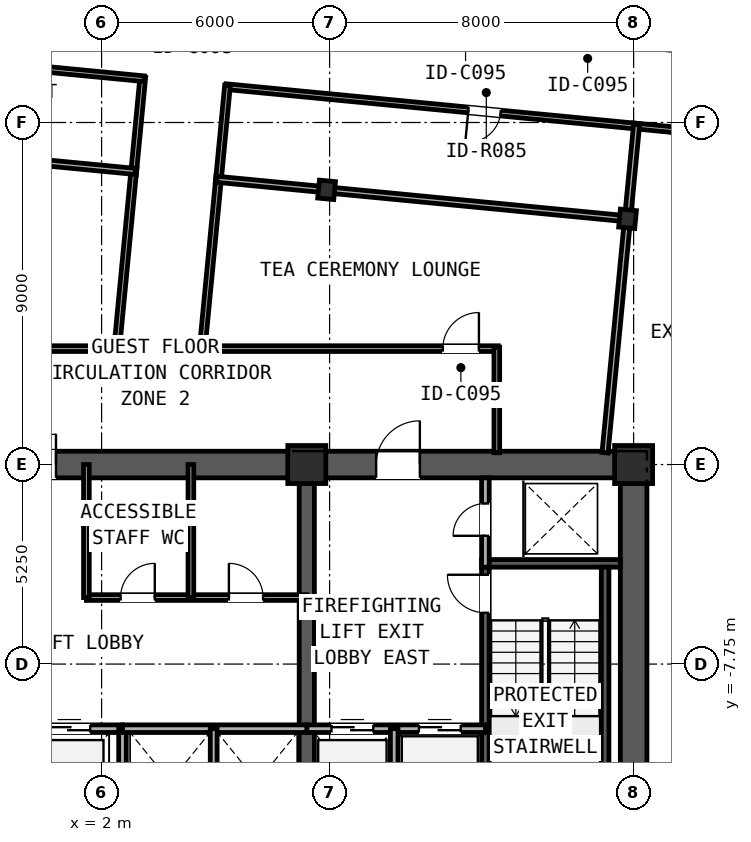
"""IFC4 building model, lengths in metres.
Left out: names, types, materials, properties, quantities, classifications, styles, units other than length and angle.
Written with IfcOpenShell. Run it as: python <this file> out.ifc"""

import sys

from ifc_helpers import new_model, si_unit, direction, frame, frame_2d, origin, origin_2d, place, context, subcontext, project, spatial, rectangle, i_section, extrude, element, fill, save


model = new_model("IFC4")
c1 = context("Model", 3, precision=1e-05, world=origin(), true_north=direction((0.0, 1.0)))
c2 = subcontext(c1, "Body", "Model", "MODEL_VIEW")
j1 = project(units=[si_unit("LENGTHUNIT", "METRE"), si_unit("PLANEANGLEUNIT", "RADIAN")], contexts=[c1])
p1 = place(None, origin())
s1 = spatial("IfcSite", under=j1, at=p1, CompositionType="ELEMENT")
p2 = place(p1, origin())
s2 = spatial("IfcBuilding", under=s1, at=p2, CompositionType="ELEMENT")
p3 = place(p2, frame((0.0, 0.0, 146.25)))
s3 = spatial("IfcBuildingStorey", under=s2, at=p3, CompositionType="ELEMENT", Elevation=146.25)
p4 = place(p3, frame((-16.35, -2.5, 0.0), z_axis=(0.0, 0.0, 1.0), x_axis=(1.0, 0.0, 0.0)))
e1 = element("IfcWall", 1, at=p4, inside=s3, PredefinedType="SHEAR", context=c2, shape_type="SweptSolid", body=[
    extrude(rectangle(XDim=32.7, YDim=0.7, at=frame_2d((16.35, 0.0))), origin(), (0.0, 0.0, 1.0), 2.91),
])
p5 = place(p4, frame((5.975, 0.0, 0.0)))
e2 = element("IfcOpeningElement", 2, at=p5, cuts=e1, PredefinedType="OPENING", context=c2, shape_type="SweptSolid", body=[
    extrude(rectangle(XDim=1.15, YDim=2.0, at=frame_2d((0.575, 1.0))), frame((0.0, 0.36, 0.0), z_axis=(0.0, -1.0, 0.0), x_axis=(1.0, 0.0, 0.0)), (0.0, 0.0, 1.0), 0.72),
])
p6 = place(p4, frame((15.55, 0.0, 0.0)))
e3 = element("IfcOpeningElement", 3, at=p6, cuts=e1, PredefinedType="OPENING", context=c2, shape_type="SweptSolid", body=[
    extrude(rectangle(XDim=1.6, YDim=2.0, at=frame_2d((0.8, 1.0))), frame((0.0, 0.36, 0.0), z_axis=(0.0, -1.0, 0.0), x_axis=(1.0, 0.0, 0.0)), (0.0, 0.0, 1.0), 0.72),
])
p7 = place(p4, frame((25.575, 0.0, 0.0)))
e4 = element("IfcOpeningElement", 4, at=p7, cuts=e1, PredefinedType="OPENING", context=c2, shape_type="SweptSolid", body=[
    extrude(rectangle(XDim=1.15, YDim=2.0, at=frame_2d((0.575, 1.0))), frame((0.0, 0.36, 0.0), z_axis=(0.0, -1.0, 0.0), x_axis=(1.0, 0.0, 0.0)), (0.0, 0.0, 1.0), 0.72),
])
p8 = place(p3, frame((16.0, -12.65, 0.0), z_axis=(0.0, 0.0, 1.0), x_axis=(0.0, 1.0, 0.0)))
e5 = element("IfcWall", 5, at=p8, inside=s3, PredefinedType="SHEAR", context=c2, shape_type="SweptSolid", body=[
    extrude(rectangle(XDim=9.8, YDim=0.7, at=frame_2d((4.9, 0.0))), origin(), (0.0, 0.0, 1.0), 2.91),
])
p9 = place(p3, frame((7.4, -12.65, 0.0), z_axis=(0.0, 0.0, 1.0), x_axis=(0.0, 1.0, 0.0)))
e6 = element("IfcWall", 6, at=p9, inside=s3, PredefinedType="SHEAR", context=c2, shape_type="SweptSolid", body=[
    extrude(rectangle(XDim=9.8, YDim=0.4, at=frame_2d((4.9, 0.0))), origin(), (0.0, 0.0, 1.0), 3.19),
])
p10 = place(p3, frame((12.0, -5.1, 0.0), z_axis=(0.0, 0.0, 1.0), x_axis=(1.0, 0.0, 0.0)))
e7 = element("IfcWall", 7, at=p10, inside=s3, PredefinedType="SOLIDWALL", context=c2, shape_type="SweptSolid", body=[
    extrude(rectangle(XDim=3.65, YDim=0.2, at=frame_2d((1.825, 0.0))), origin(), (0.0, 0.0, 1.0), 3.19),
])
p11 = place(p3, frame((12.1, -12.2, 0.0), z_axis=(0.0, 0.0, 1.0), x_axis=(0.0, 1.0, 0.0)))
e8 = element("IfcWall", 8, at=p11, inside=s3, PredefinedType="SOLIDWALL", context=c2, shape_type="SweptSolid", body=[
    extrude(rectangle(XDim=7.0, YDim=0.2, at=frame_2d((3.5, 0.0))), origin(), (0.0, 0.0, 1.0), 3.19),
])
p12 = place(p11, frame((5.8, 0.0, 0.0)))
e9 = element("IfcOpeningElement", 9, at=p12, cuts=e8, PredefinedType="OPENING", context=c2, shape_type="SweptSolid", body=[
    extrude(rectangle(XDim=1.0, YDim=2.1, at=frame_2d((0.5, 1.05))), frame((0.0, 0.11, 0.0), z_axis=(0.0, -1.0, 0.0), x_axis=(1.0, 0.0, 0.0)), (0.0, 0.0, 1.0), 0.22),
])
p13 = place(p3, frame((15.25, -12.2, 0.0), z_axis=(0.0, 0.0, 1.0), x_axis=(0.0, 1.0, 0.0)))
e10 = element("IfcWall", 10, at=p13, inside=s3, PredefinedType="SOLIDWALL", context=c2, shape_type="SweptSolid", body=[
    extrude(rectangle(XDim=7.0, YDim=0.2, at=frame_2d((3.5, 0.0))), origin(), (0.0, 0.0, 1.0), 3.19),
])
for number, where, z_axis, x_axis in (
    (11, (7.4, -2.5, 0.0), (0.0, 0.0, 1.0), (1.0, 0.0, 0.0)),
    (12, (16.0, -2.5, 0.0), (0.0, 0.0, 1.0), (1.0, 0.0, 0.0)),
):
    element("IfcColumn", number, at=place(p3, frame(where, z_axis=z_axis, x_axis=x_axis)), inside=s3, PredefinedType="COLUMN", context=c2, shape_type="SweptSolid", body=[
        extrude(rectangle(XDim=1.0, YDim=1.0, at=origin_2d()), origin(), (0.0, 0.0, 1.0), 3.45),
    ])
for number, where, z_axis, x_axis in (
    (13, (7.921, 4.728, 0.0), (0.0, 0.0, 1.0), (0.995, -0.096, 0.0)),
    (14, (15.84, 3.965, 0.0), (0.0, 0.0, 1.0), (0.995, -0.096, 0.0)),
):
    element("IfcColumn", number, at=place(p3, frame(where, z_axis=z_axis, x_axis=x_axis)), inside=s3, PredefinedType="COLUMN", context=c2, shape_type="SweptSolid", body=[
        extrude(i_section(OverallWidth=0.424, OverallDepth=0.474, WebThickness=0.048, FlangeThickness=0.077, FilletRadius=0.031, at=origin_2d()), origin(), (0.0, 0.0, 1.0), 3.45),
    ])
p14 = place(p3, frame((12.1, -5.2, 0.0), z_axis=(0.0, 0.0, 1.0), x_axis=(0.0, 1.0, 0.0)))
e15 = element("IfcWall", 15, at=p14, inside=s3, PredefinedType="PARTITIONING", context=c2, shape_type="SweptSolid", body=[
    extrude(rectangle(XDim=2.35, YDim=0.2, at=frame_2d((1.175, 0.0))), origin(), (0.0, 0.0, 1.0), 2.225),
])
p15 = place(p14, frame((0.825, 0.0, 0.0)))
e16 = element("IfcOpeningElement", 16, at=p15, cuts=e15, PredefinedType="OPENING", context=c2, shape_type="SweptSolid", body=[
    extrude(rectangle(XDim=0.85, YDim=2.05, at=frame_2d((0.425, 1.025))), frame((0.0, 0.11, 0.0), z_axis=(0.0, -1.0, 0.0), x_axis=(1.0, 0.0, 0.0)), (0.0, 0.0, 1.0), 0.22),
])
p16 = place(p3, frame((7.4, -9.45, 0.0), z_axis=(0.0, 0.0, 1.0), x_axis=(1.0, 0.0, 0.0)))
e17 = element("IfcWall", 17, at=p16, inside=s3, PredefinedType="PARTITIONING", context=c2, shape_type="SweptSolid", body=[
    extrude(rectangle(XDim=4.7, YDim=0.2, at=frame_2d((2.35, 0.0))), origin(), (0.0, 0.0, 1.0), 3.19),
])
p17 = place(p16, frame((2.95, 0.0, 0.0)))
e18 = element("IfcOpeningElement", 18, at=p17, cuts=e17, PredefinedType="OPENING", context=c2, shape_type="SweptSolid", body=[
    extrude(rectangle(XDim=1.1, YDim=2.2, at=frame_2d((0.55, 1.1))), frame((0.0, 0.11, 0.0), z_axis=(0.0, -1.0, 0.0), x_axis=(1.0, 0.0, 0.0)), (0.0, 0.0, 1.0), 0.22),
])
p18 = place(p16, frame((0.65, 0.0, 0.0)))
e19 = element("IfcOpeningElement", 19, at=p18, cuts=e17, PredefinedType="OPENING", context=c2, shape_type="SweptSolid", body=[
    extrude(rectangle(XDim=1.1, YDim=2.2, at=frame_2d((0.55, 1.1))), frame((0.0, 0.11, 0.0), z_axis=(0.0, -1.0, 0.0), x_axis=(1.0, 0.0, 0.0)), (0.0, 0.0, 1.0), 0.22),
])
p19 = place(p3, frame((9.7, -12.65, 0.0), z_axis=(0.0, 0.0, 1.0), x_axis=(0.0, 1.0, 0.0)))
e20 = element("IfcWall", 20, at=p19, inside=s3, PredefinedType="PARTITIONING", context=c2, shape_type="SweptSolid", body=[
    extrude(rectangle(XDim=3.2, YDim=0.2, at=frame_2d((1.6, 0.0))), origin(), (0.0, 0.0, 1.0), 2.225),
])
p20 = place(p3, frame((-2.55, -9.45, 0.0), z_axis=(0.0, 0.0, 1.0), x_axis=(1.0, 0.0, 0.0)))
e21 = element("IfcWall", 21, at=p20, inside=s3, PredefinedType="PARTITIONING", context=c2, shape_type="SweptSolid", body=[
    extrude(rectangle(XDim=5.1, YDim=0.2, at=frame_2d((2.55, 0.0))), origin(), (0.0, 0.0, 1.0), 3.19),
])
p21 = place(p20, frame((0.85, 0.0, 0.0)))
e22 = element("IfcOpeningElement", 22, at=p21, cuts=e21, PredefinedType="OPENING", context=c2, shape_type="SweptSolid", body=[
    extrude(rectangle(XDim=1.1, YDim=2.2, at=frame_2d((0.55, 1.1))), frame((0.0, 0.11, 0.0), z_axis=(0.0, -1.0, 0.0), x_axis=(1.0, 0.0, 0.0)), (0.0, 0.0, 1.0), 0.22),
])
p22 = place(p20, frame((3.15, 0.0, 0.0)))
e23 = element("IfcOpeningElement", 23, at=p22, cuts=e21, PredefinedType="OPENING", context=c2, shape_type="SweptSolid", body=[
    extrude(rectangle(XDim=1.1, YDim=2.2, at=frame_2d((0.55, 1.1))), frame((0.0, 0.11, 0.0), z_axis=(0.0, -1.0, 0.0), x_axis=(1.0, 0.0, 0.0)), (0.0, 0.0, 1.0), 0.22),
])
p23 = place(p3, frame((2.55, -12.65, 0.0), z_axis=(0.0, 0.0, 1.0), x_axis=(0.0, 1.0, 0.0)))
e24 = element("IfcWall", 24, at=p23, inside=s3, PredefinedType="PARTITIONING", context=c2, shape_type="SweptSolid", body=[
    extrude(rectangle(XDim=3.2, YDim=0.2, at=frame_2d((1.6, 0.0))), origin(), (0.0, 0.0, 1.0), 2.225),
])
p24 = place(p3, frame((2.55, -9.45, 0.0), z_axis=(0.0, 0.0, 1.0), x_axis=(1.0, 0.0, 0.0)))
e25 = element("IfcWall", 25, at=p24, inside=s3, PredefinedType="PARTITIONING", context=c2, shape_type="SweptSolid", body=[
    extrude(rectangle(XDim=4.85, YDim=0.2, at=frame_2d((2.425, 0.0))), origin(), (0.0, 0.0, 1.0), 3.19),
])
p25 = place(p3, frame((4.95, -12.65, 0.0), z_axis=(0.0, 0.0, 1.0), x_axis=(0.0, 1.0, 0.0)))
e26 = element("IfcWall", 26, at=p25, inside=s3, PredefinedType="PARTITIONING", context=c2, shape_type="SweptSolid", body=[
    extrude(rectangle(XDim=3.2, YDim=0.18, at=frame_2d((1.6, 0.0))), origin(), (0.0, 0.0, 1.0), 2.225),
])
p26 = place(p3, frame((1.6, -6.0, 0.0), z_axis=(0.0, 0.0, 1.0), x_axis=(1.0, 0.0, 0.0)))
e27 = element("IfcWall", 27, at=p26, inside=s3, PredefinedType="PARTITIONING", context=c2, shape_type="SweptSolid", body=[
    extrude(rectangle(XDim=5.8, YDim=0.15, at=frame_2d((2.9, 0.0))), origin(), (0.0, 0.0, 1.0), 3.19),
])
p27 = place(p26, frame((0.9, 0.0, 0.0)))
e28 = element("IfcOpeningElement", 28, at=p27, cuts=e27, PredefinedType="OPENING", context=c2, shape_type="SweptSolid", body=[
    extrude(rectangle(XDim=0.9, YDim=2.1, at=frame_2d((0.45, 1.05))), frame((0.0, 0.085, 0.0), z_axis=(0.0, -1.0, 0.0), x_axis=(1.0, 0.0, 0.0)), (0.0, 0.0, 1.0), 0.17),
])
p28 = place(p26, frame((3.75, 0.0, 0.0)))
e29 = element("IfcOpeningElement", 29, at=p28, cuts=e27, PredefinedType="OPENING", context=c2, shape_type="SweptSolid", body=[
    extrude(rectangle(XDim=0.9, YDim=2.1, at=frame_2d((0.45, 1.05))), frame((0.0, 0.085, 0.0), z_axis=(0.0, -1.0, 0.0), x_axis=(1.0, 0.0, 0.0)), (0.0, 0.0, 1.0), 0.17),
])
for number, where, z_axis, x_axis in (
    (30, (1.6, -6.0, 0.0), (0.0, 0.0, 1.0), (0.0, 1.0, 0.0)),
    (31, (4.35, -6.0, 0.0), (0.0, 0.0, 1.0), (0.0, 1.0, 0.0)),
):
    element("IfcWall", number, at=place(p3, frame(where, z_axis=z_axis, x_axis=x_axis)), inside=s3, PredefinedType="PARTITIONING", context=c2, shape_type="SweptSolid", body=[
        extrude(rectangle(XDim=3.5, YDim=0.15, at=frame_2d((1.75, 0.0))), origin(), (0.0, 0.0, 1.0), 2.225),
    ])
p29 = place(p3, frame((16.199, 8.552, 0.0), z_axis=(0.0, 0.0, 1.0), x_axis=(0.995391104887, -0.095898635608, 0.0)))
e32 = element("IfcWall", 32, at=p29, inside=s3, PredefinedType="PARTITIONING", context=c2, shape_type="SweptSolid", body=[
    extrude(rectangle(XDim=3.722, YDim=0.15, at=frame_2d((1.861, 0.0))), origin(), (0.0, 0.0, 1.0), 2.479),
])
p30 = place(p29, frame((2.457, 0.0, 0.0)))
e33 = element("IfcOpeningElement", 33, at=p30, cuts=e32, PredefinedType="OPENING", context=c2, shape_type="SweptSolid", body=[
    extrude(rectangle(XDim=0.95, YDim=2.15, at=frame_2d((0.475, 1.075))), frame((0.0, 0.085, 0.0), z_axis=(0.0, -1.0, 0.0), x_axis=(1.0, 0.0, 0.0)), (0.0, 0.0, 1.0), 0.17),
])
p31 = place(p3, frame((16.156, 6.396, 0.0), z_axis=(0.0, 0.0, 1.0), x_axis=(-0.99539478422, 0.095860437863, 0.0)))
e34 = element("IfcWall", 34, at=p31, inside=s3, PredefinedType="PARTITIONING", context=c2, shape_type="SweptSolid", body=[
    extrude(rectangle(XDim=10.936, YDim=0.15, at=frame_2d((5.468, 0.0))), origin(), (0.0, 0.0, 1.0), 2.479),
])
p32 = place(p31, frame((3.675, 0.0, 0.0)))
e35 = element("IfcOpeningElement", 35, at=p32, cuts=e34, PredefinedType="OPENING", context=c2, shape_type="SweptSolid", body=[
    extrude(rectangle(XDim=0.85, YDim=2.05, at=frame_2d((0.425, 1.025))), frame((0.0, 0.085, 0.0), z_axis=(0.0, -1.0, 0.0), x_axis=(1.0, 0.0, 0.0)), (0.0, 0.0, 1.0), 0.17),
])
for number, where, z_axis, x_axis in (
    (36, (5.314, 7.48, 0.0), (0.0, 0.0, 1.0), (-0.096, -0.995, 0.0)),
    (37, (2.838, 5.135, 0.0), (0.0, 0.0, 1.0), (0.096, 0.995, 0.0)),
):
    element("IfcWall", number, at=place(p3, frame(where, z_axis=z_axis, x_axis=x_axis)), inside=s3, PredefinedType="PARTITIONING", context=c2, shape_type="SweptSolid", body=[
        extrude(rectangle(XDim=2.572, YDim=0.15, at=frame_2d((1.286, 0.0))), origin(), (0.0, 0.0, 1.0), 2.479),
    ])
p33 = place(p3, frame((3.121, 7.651, 0.0), z_axis=(0.0, 0.0, 1.0), x_axis=(-0.995397135603, 0.095836018457, 0.0)))
e38 = element("IfcWall", 38, at=p33, inside=s3, PredefinedType="PARTITIONING", context=c2, shape_type="SweptSolid", body=[
    extrude(rectangle(XDim=18.892, YDim=0.15, at=frame_2d((9.446, 0.0))), origin(), (0.0, 0.0, 1.0), 2.479),
])
p34 = place(p33, frame((14.502, 0.0, 0.0)))
e39 = element("IfcOpeningElement", 39, at=p34, cuts=e38, PredefinedType="OPENING", context=c2, shape_type="SweptSolid", body=[
    extrude(rectangle(XDim=0.95, YDim=2.15, at=frame_2d((0.475, 1.075))), frame((0.0, 0.085, 0.0), z_axis=(0.0, -1.0, 0.0), x_axis=(1.0, 0.0, 0.0)), (0.0, 0.0, 1.0), 0.17),
])
p35 = place(p3, frame((5.084, 5.083, 0.0), z_axis=(0.0, 0.0, 1.0), x_axis=(-0.095867331855, -0.995394120277, 0.0)))
e40 = element("IfcWall", 40, at=p35, inside=s3, PredefinedType="PARTITIONING", context=c2, shape_type="SweptSolid", body=[
    extrude(rectangle(XDim=4.594, YDim=0.15, at=frame_2d((2.297, 0.0))), origin(), (0.0, 0.0, 1.0), 2.479),
])
p36 = place(p3, frame((4.607, 0.55, 0.0), z_axis=(0.0, 0.0, 1.0), x_axis=(1.0, 0.0, 0.0)))
e41 = element("IfcWall", 41, at=p36, inside=s3, PredefinedType="PARTITIONING", context=c2, shape_type="SweptSolid", body=[
    extrude(rectangle(XDim=7.833, YDim=0.15, at=frame_2d((3.917, 0.0))), origin(), (0.0, 0.0, 1.0), 2.479),
])
p37 = place(p36, frame((6.372, 0.0, 0.0)))
e42 = element("IfcOpeningElement", 42, at=p37, cuts=e41, PredefinedType="OPENING", context=c2, shape_type="SweptSolid", body=[
    extrude(rectangle(XDim=0.95, YDim=2.15, at=frame_2d((0.475, 1.075))), frame((0.0, 0.085, 0.0), z_axis=(0.0, -1.0, 0.0), x_axis=(1.0, 0.0, 0.0)), (0.0, 0.0, 1.0), 0.17),
])
p38 = place(p3, frame((12.4, 0.59, 0.0), z_axis=(0.0, 0.0, 1.0), x_axis=(0.0, -1.0, 0.0)))
e43 = element("IfcWall", 43, at=p38, inside=s3, PredefinedType="PARTITIONING", context=c2, shape_type="SweptSolid", body=[
    extrude(rectangle(XDim=2.78, YDim=0.15, at=frame_2d((1.39, 0.0))), origin(), (0.0, 0.0, 1.0), 2.225),
])
p39 = place(p3, frame((19.698, 6.055, 0.0), z_axis=(0.0, 0.0, 1.0), x_axis=(-0.995397364202, 0.095833644092, 0.0)))
e44 = element("IfcWall", 44, at=p39, inside=s3, PredefinedType="PARTITIONING", context=c2, shape_type="SweptSolid", body=[
    extrude(rectangle(XDim=3.722, YDim=0.15, at=frame_2d((1.861, 0.0))), origin(), (0.0, 0.0, 1.0), 2.479),
])
p40 = place(p39, frame((0.315, 0.0, 0.0)))
e45 = element("IfcOpeningElement", 45, at=p40, cuts=e44, PredefinedType="OPENING", context=c2, shape_type="SweptSolid", body=[
    extrude(rectangle(XDim=0.95, YDim=2.15, at=frame_2d((0.475, 1.075))), frame((0.0, 0.085, 0.0), z_axis=(0.0, -1.0, 0.0), x_axis=(1.0, 0.0, 0.0)), (0.0, 0.0, 1.0), 0.17),
])
p41 = place(p3, frame((-12.44, 0.55, 0.0), z_axis=(0.0, 0.0, 1.0), x_axis=(1.0, 0.0, 0.0)))
e46 = element("IfcWall", 46, at=p41, inside=s3, PredefinedType="PARTITIONING", context=c2, shape_type="SweptSolid", body=[
    extrude(rectangle(XDim=14.877, YDim=0.15, at=frame_2d((7.438, 0.0))), origin(), (0.0, 0.0, 1.0), 2.479),
])
p42 = place(p41, frame((9.449, 0.0, 0.0)))
e47 = element("IfcOpeningElement", 47, at=p42, cuts=e46, PredefinedType="OPENING", context=c2, shape_type="SweptSolid", body=[
    extrude(rectangle(XDim=0.95, YDim=2.15, at=frame_2d((0.475, 1.075))), frame((0.0, 0.085, 0.0), z_axis=(0.0, -1.0, 0.0), x_axis=(1.0, 0.0, 0.0)), (0.0, 0.0, 1.0), 0.17),
])
p43 = place(p3, frame((2.393, 0.51, 0.0), z_axis=(0.0, 0.0, 1.0), x_axis=(0.095829431913, 0.995397769728, 0.0)))
e48 = element("IfcWall", 48, at=p43, inside=s3, PredefinedType="PARTITIONING", context=c2, shape_type="SweptSolid", body=[
    extrude(rectangle(XDim=4.81, YDim=0.15, at=frame_2d((2.405, 0.0))), origin(), (0.0, 0.0, 1.0), 2.479),
])
p44 = place(p3, frame((7.745, 4.745, 0.0), z_axis=(0.0, 0.0, 1.0), x_axis=(-0.995392910691, 0.095879890208, 0.0)))
e49 = element("IfcWall", 49, at=p44, inside=s3, PredefinedType="PARTITIONING", context=c2, shape_type="SweptSolid", body=[
    extrude(rectangle(XDim=2.722, YDim=0.16, at=frame_2d((1.361, 0.0))), origin(), (0.0, 0.0, 1.0), 2.479),
])
p45 = place(p3, frame((15.665, 3.982, 0.0), z_axis=(0.0, 0.0, 1.0), x_axis=(-0.995396667246, 0.095840882902, 0.0)))
e50 = element("IfcWall", 50, at=p45, inside=s3, PredefinedType="PARTITIONING", context=c2, shape_type="SweptSolid", body=[
    extrude(rectangle(XDim=7.604, YDim=0.16, at=frame_2d((3.802, 0.0))), origin(), (0.0, 0.0, 1.0), 2.479),
])
p46 = place(p3, frame((16.079, 6.444, 0.0), z_axis=(0.0, 0.0, 1.0), x_axis=(-0.095794827695, -0.995401100555, 0.0)))
e51 = element("IfcWall", 51, at=p46, inside=s3, PredefinedType="PARTITIONING", context=c2, shape_type="SweptSolid", body=[
    extrude(rectangle(XDim=2.314, YDim=0.16, at=frame_2d((1.157, 0.0))), origin(), (0.0, 0.0, 1.0), 2.479),
])
p47 = place(p3, frame((2.886, 5.213, 0.0), z_axis=(0.0, 0.0, 1.0), x_axis=(-0.995401466761, 0.095791022391, 0.0)))
e52 = element("IfcWall", 52, at=p47, inside=s3, PredefinedType="PARTITIONING", context=c2, shape_type="SweptSolid", body=[
    extrude(rectangle(XDim=2.722, YDim=0.16, at=frame_2d((1.361, 0.0))), origin(), (0.0, 0.0, 1.0), 2.479),
])
p48 = place(p3, frame((15.823, 3.79, 0.0), z_axis=(0.0, 0.0, 1.0), x_axis=(-0.095865726078, -0.99539427493, 0.0)))
e53 = element("IfcWall", 53, at=p48, inside=s3, PredefinedType="PARTITIONING", context=c2, shape_type="SweptSolid", body=[
    extrude(rectangle(XDim=6.008, YDim=0.16, at=frame_2d((3.004, 0.0))), origin(), (0.0, 0.0, 1.0), 2.225),
])
p49 = place(p12, origin())
e54 = element("IfcDoor", 54, at=p49, inside=s3, OperationType="SINGLE_SWING_RIGHT", PredefinedType="DOOR", context=c2, shape_type="SweptSolid", body=[
    extrude(rectangle(XDim=1.0, YDim=2.1, at=frame_2d((0.5, 1.05))), frame((0.0, 0.025, 0.0), z_axis=(0.0, -1.0, 0.0), x_axis=(1.0, 0.0, 0.0)), (0.0, 0.0, 1.0), 0.05),
])
fill(e9, e54)
p50 = place(p15, frame((0.85, 0.0, 0.0), z_axis=(0.0, 0.0, 1.0), x_axis=(-1.0, 0.0, 0.0)))
e55 = element("IfcDoor", 55, at=p50, inside=s3, OperationType="SINGLE_SWING_LEFT", PredefinedType="DOOR", context=c2, shape_type="SweptSolid", body=[
    extrude(rectangle(XDim=0.85, YDim=2.05, at=frame_2d((0.425, 1.025))), frame((0.0, 0.025, 0.0), z_axis=(0.0, -1.0, 0.0), x_axis=(1.0, 0.0, 0.0)), (0.0, 0.0, 1.0), 0.05),
])
fill(e16, e55)
p51 = place(p17, origin())
e56 = element("IfcDoor", 56, at=p51, inside=s3, OperationType="SLIDING_TO_LEFT", PredefinedType="DOOR", context=c2, shape_type="SweptSolid", body=[
    extrude(rectangle(XDim=1.1, YDim=2.2, at=frame_2d((0.55, 1.1))), frame((0.0, 0.025, 0.0), z_axis=(0.0, -1.0, 0.0), x_axis=(1.0, 0.0, 0.0)), (0.0, 0.0, 1.0), 0.05),
])
fill(e18, e56)
p52 = place(p18, origin())
e57 = element("IfcDoor", 57, at=p52, inside=s3, OperationType="SLIDING_TO_RIGHT", PredefinedType="DOOR", context=c2, shape_type="SweptSolid", body=[
    extrude(rectangle(XDim=1.1, YDim=2.2, at=frame_2d((0.55, 1.1))), frame((0.0, 0.025, 0.0), z_axis=(0.0, -1.0, 0.0), x_axis=(1.0, 0.0, 0.0)), (0.0, 0.0, 1.0), 0.05),
])
fill(e19, e57)
p53 = place(p6, origin())
e58 = element("IfcDoor", 58, at=p53, inside=s3, OperationType="DOUBLE_DOOR_SINGLE_SWING", PredefinedType="DOOR", context=c2, shape_type="SweptSolid", body=[
    extrude(rectangle(XDim=1.6, YDim=2.0, at=frame_2d((0.8, 1.0))), frame((0.0, 0.025, 0.0), z_axis=(0.0, -1.0, 0.0), x_axis=(1.0, 0.0, 0.0)), (0.0, 0.0, 1.0), 0.05),
])
fill(e3, e58)
p54 = place(p7, origin())
e59 = element("IfcDoor", 59, at=p54, inside=s3, OperationType="SINGLE_SWING_RIGHT", PredefinedType="DOOR", context=c2, shape_type="SweptSolid", body=[
    extrude(rectangle(XDim=1.15, YDim=2.0, at=frame_2d((0.575, 1.0))), frame((0.0, 0.025, 0.0), z_axis=(0.0, -1.0, 0.0), x_axis=(1.0, 0.0, 0.0)), (0.0, 0.0, 1.0), 0.05),
])
fill(e4, e59)
p55 = place(p22, origin())
e60 = element("IfcDoor", 60, at=p55, inside=s3, OperationType="SLIDING_TO_RIGHT", PredefinedType="DOOR", context=c2, shape_type="SweptSolid", body=[
    extrude(rectangle(XDim=1.1, YDim=2.2, at=frame_2d((0.55, 1.1))), frame((0.0, 0.025, 0.0), z_axis=(0.0, -1.0, 0.0), x_axis=(1.0, 0.0, 0.0)), (0.0, 0.0, 1.0), 0.05),
])
fill(e23, e60)
p56 = place(p27, frame((0.9, 0.0, 0.0), z_axis=(0.0, 0.0, 1.0), x_axis=(-1.0, 0.0, 0.0)))
e61 = element("IfcDoor", 61, at=p56, inside=s3, OperationType="SINGLE_SWING_RIGHT", PredefinedType="DOOR", context=c2, shape_type="SweptSolid", body=[
    extrude(rectangle(XDim=0.9, YDim=2.1, at=frame_2d((0.45, 1.05))), frame((0.0, 0.025, 0.0), z_axis=(0.0, -1.0, 0.0), x_axis=(1.0, 0.0, 0.0)), (0.0, 0.0, 1.0), 0.05),
])
fill(e28, e61)
p57 = place(p28, frame((0.9, 0.0, 0.0), z_axis=(0.0, 0.0, 1.0), x_axis=(-1.0, 0.0, 0.0)))
e62 = element("IfcDoor", 62, at=p57, inside=s3, OperationType="SINGLE_SWING_LEFT", PredefinedType="DOOR", context=c2, shape_type="SweptSolid", body=[
    extrude(rectangle(XDim=0.9, YDim=2.1, at=frame_2d((0.45, 1.05))), frame((0.0, 0.025, 0.0), z_axis=(0.0, -1.0, 0.0), x_axis=(1.0, 0.0, 0.0)), (0.0, 0.0, 1.0), 0.05),
])
fill(e29, e62)
p58 = place(p32, frame((0.85, 0.0, 0.0), z_axis=(0.0, 0.0, 1.0), x_axis=(-1.0, 0.0, 0.0)))
e63 = element("IfcDoor", 63, at=p58, inside=s3, OperationType="SINGLE_SWING_RIGHT", PredefinedType="DOOR", context=c2, shape_type="SweptSolid", body=[
    extrude(rectangle(XDim=0.85, YDim=2.05, at=frame_2d((0.425, 1.025))), frame((0.0, 0.025, 0.0), z_axis=(0.0, -1.0, 0.0), x_axis=(1.0, 0.0, 0.0)), (0.0, 0.0, 1.0), 0.05),
])
fill(e35, e63)
p59 = place(p37, origin())
e64 = element("IfcDoor", 64, at=p59, inside=s3, OperationType="SINGLE_SWING_RIGHT", PredefinedType="DOOR", context=c2, shape_type="SweptSolid", body=[
    extrude(rectangle(XDim=0.95, YDim=2.15, at=frame_2d((0.475, 1.075))), frame((0.0, 0.025, 0.0), z_axis=(0.0, -1.0, 0.0), x_axis=(1.0, 0.0, 0.0)), (0.0, 0.0, 1.0), 0.05),
])
fill(e42, e64)
save(model, sys.argv[1])
